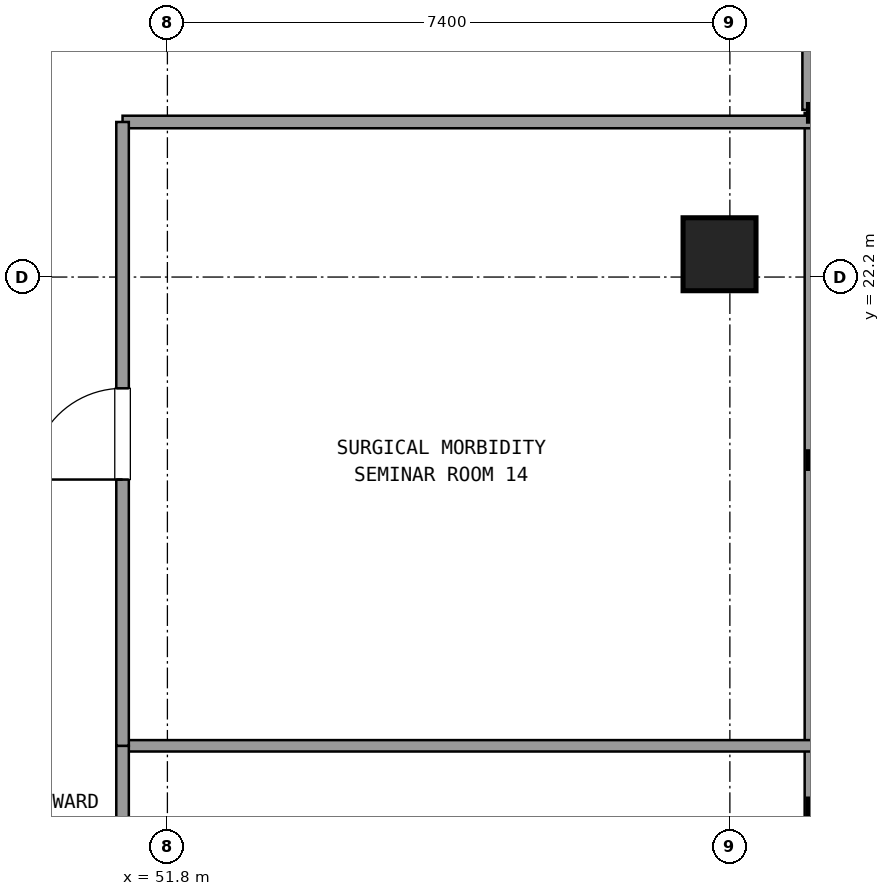
"""IFC4 building model, lengths in metres.
Left out: names, types, materials, properties, quantities, classifications, styles, units other than length and angle.
Written with IfcOpenShell. Run it as: python <this file> out.ifc"""

import sys

from ifc_helpers import new_model, si_unit, direction, frame, frame_2d, origin, origin_2d, place, context, subcontext, project, spatial, rectangle, extrude, element, fill, save


model = new_model("IFC4")
c1 = context("Model", 3, precision=1e-05, world=origin(), true_north=direction((0.0, 1.0)))
c2 = subcontext(c1, "Body", "Model", "MODEL_VIEW")
j1 = project(units=[si_unit("LENGTHUNIT", "METRE"), si_unit("PLANEANGLEUNIT", "RADIAN")], contexts=[c1])
p1 = place(None, origin())
s1 = spatial("IfcSite", under=j1, at=p1, CompositionType="ELEMENT")
p2 = place(p1, origin())
s2 = spatial("IfcBuilding", under=s1, at=p2, CompositionType="ELEMENT")
p3 = place(p2, frame((0.0, 0.0, 174.42)))
s3 = spatial("IfcBuildingStorey", under=s2, at=p3, CompositionType="ELEMENT", Elevation=174.42)
p4 = place(p3, frame((59.064, 22.5, 0.0), z_axis=(0.0, 0.0, 1.0), x_axis=(1.0, 0.0, 0.0)))
e1 = element("IfcColumn", 1, at=p4, inside=s3, PredefinedType="COLUMN", context=c2, shape_type="SweptSolid", body=[
    extrude(rectangle(XDim=0.96, YDim=0.96, at=origin_2d()), origin(), (0.0, 0.0, 1.0), 3.579),
])
p5 = place(p3, frame((60.304, 24.4, 0.0), z_axis=(0.0, 0.0, 1.0), x_axis=(0.0, 1.0, 0.0)))
e2 = element("IfcWall", 2, at=p5, inside=s3, PredefinedType="SOLIDWALL", context=c2, shape_type="SweptSolid", body=[
    extrude(rectangle(XDim=3.0, YDim=0.3, at=frame_2d((1.5, 0.0))), origin(), (0.0, 0.0, 1.0), 2.65),
])
p6 = place(p5, frame((0.9, 0.0, 0.0)))
e3 = element("IfcOpeningElement", 3, at=p6, cuts=e2, PredefinedType="OPENING", context=c2, shape_type="SweptSolid", body=[
    extrude(rectangle(XDim=1.2, YDim=2.2, at=frame_2d((0.6, 1.1))), frame((0.0, 0.16, 0.0), z_axis=(0.0, -1.0, 0.0), x_axis=(1.0, 0.0, 0.0)), (0.0, 0.0, 1.0), 0.32),
])
p7 = place(p3, frame((60.304, 10.655, 0.0), z_axis=(0.0, 0.0, 1.0), x_axis=(0.0, 1.0, 0.0)))
e4 = element("IfcWall", 4, at=p7, inside=s3, PredefinedType="SOLIDWALL", context=c2, shape_type="SweptSolid", body=[
    extrude(rectangle(XDim=13.705, YDim=0.24, at=frame_2d((6.853, 0.0))), origin(), (0.0, 0.0, 1.0), 0.85),
])
p8 = place(p3, frame((51.21, 24.24, 0.0), z_axis=(0.0, 0.0, 1.0), x_axis=(1.0, 0.0, 0.0)))
e5 = element("IfcWall", 5, at=p8, inside=s3, PredefinedType="PARTITIONING", context=c2, shape_type="SweptSolid", body=[
    extrude(rectangle(XDim=9.074, YDim=0.165, at=frame_2d((4.537, 0.0))), origin(), (0.0, 0.0, 1.0), 2.59),
])
p9 = place(p3, frame((51.21, 16.033, 0.0), z_axis=(0.0, 0.0, 1.0), x_axis=(1.0, 0.0, 0.0)))
e6 = element("IfcWall", 6, at=p9, inside=s3, PredefinedType="PARTITIONING", context=c2, shape_type="SweptSolid", body=[
    extrude(rectangle(XDim=9.074, YDim=0.15, at=frame_2d((4.537, 0.0))), origin(), (0.0, 0.0, 1.0), 2.59),
])
p10 = place(p3, frame((51.21, 4.7, 0.0), z_axis=(0.0, 0.0, 1.0), x_axis=(0.0, 1.0, 0.0)))
e7 = element("IfcWall", 7, at=p10, inside=s3, PredefinedType="PARTITIONING", context=c2, shape_type="SweptSolid", body=[
    extrude(rectangle(XDim=11.333, YDim=0.165, at=frame_2d((5.667, 0.0))), origin(), (0.0, 0.0, 1.0), 2.59),
])
p11 = place(p10, frame((5.067, 0.0, 0.0)))
e8 = element("IfcOpeningElement", 8, at=p11, cuts=e7, PredefinedType="OPENING", context=c2, shape_type="SweptSolid", body=[
    extrude(rectangle(XDim=1.2, YDim=2.15, at=frame_2d((0.6, 1.075))), frame((0.0, 0.093, 0.0), z_axis=(0.0, -1.0, 0.0), x_axis=(1.0, 0.0, 0.0)), (0.0, 0.0, 1.0), 0.185),
])
p12 = place(p3, frame((51.21, 16.033, 0.0), z_axis=(0.0, 0.0, 1.0), x_axis=(0.0, 1.0, 0.0)))
e9 = element("IfcWall", 9, at=p12, inside=s3, PredefinedType="PARTITIONING", context=c2, shape_type="SweptSolid", body=[
    extrude(rectangle(XDim=8.207, YDim=0.165, at=frame_2d((4.104, 0.0))), origin(), (0.0, 0.0, 1.0), 2.59),
])
p13 = place(p12, frame((3.503, 0.0, 0.0)))
e10 = element("IfcOpeningElement", 10, at=p13, cuts=e9, PredefinedType="OPENING", context=c2, shape_type="SweptSolid", body=[
    extrude(rectangle(XDim=1.2, YDim=2.15, at=frame_2d((0.6, 1.075))), frame((0.0, 0.093, 0.0), z_axis=(0.0, -1.0, 0.0), x_axis=(1.0, 0.0, 0.0)), (0.0, 0.0, 1.0), 0.185),
])
p14 = place(p13, origin())
e11 = element("IfcDoor", 11, at=p14, inside=s3, OperationType="SINGLE_SWING_LEFT", PredefinedType="DOOR", context=c2, shape_type="SweptSolid", body=[
    extrude(rectangle(XDim=1.2, YDim=2.15, at=frame_2d((0.6, 1.075))), frame((0.0, 0.025, 0.0), z_axis=(0.0, -1.0, 0.0), x_axis=(1.0, 0.0, 0.0)), (0.0, 0.0, 1.0), 0.05),
])
fill(e10, e11)
save(model, sys.argv[1])
